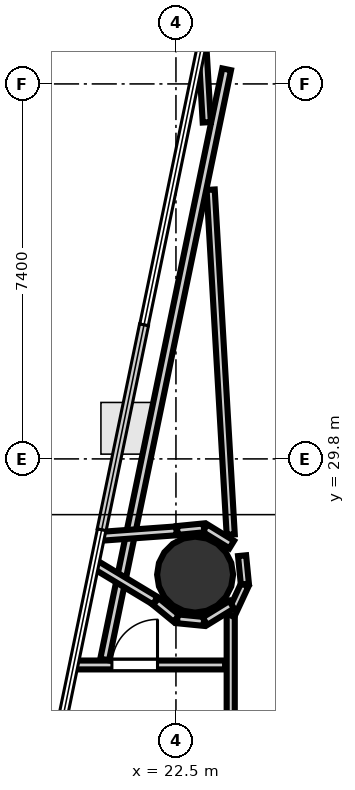
"""IFC4 building model, lengths in metres.
Left out: names, types, materials, properties, quantities, classifications, styles, units other than length and angle.
Written with IfcOpenShell. Run it as: python <this file> out.ifc"""

import sys

from ifc_helpers import new_model, si_unit, direction, frame, frame_2d, origin, origin_2d, place, context, subcontext, project, spatial, rectangle, hollow_circle, extrude, element, fill, save


model = new_model("IFC4")
c1 = context("Model", 3, precision=1e-05, world=origin(), true_north=direction((0.0, 1.0)))
c2 = subcontext(c1, "Body", "Model", "MODEL_VIEW")
j1 = project(units=[si_unit("LENGTHUNIT", "METRE"), si_unit("PLANEANGLEUNIT", "RADIAN")], contexts=[c1])
p1 = place(None, origin())
s1 = spatial("IfcSite", under=j1, at=p1, CompositionType="ELEMENT")
p2 = place(p1, origin())
s2 = spatial("IfcBuilding", under=s1, at=p2, CompositionType="ELEMENT")
p3 = place(p2, frame((0.0, 0.0, 97.8)))
s3 = spatial("IfcBuildingStorey", under=s2, at=p3, CompositionType="ELEMENT", Elevation=97.8)
p4 = place(p3, frame((22.878, 27.516, -0.23), z_axis=(0.0, 0.0, 1.0), x_axis=(1.0, 0.0, 0.0)))
e1 = element("IfcColumn", 1, at=p4, inside=s3, PredefinedType="COLUMN", context=c2, shape_type="SweptSolid", body=[
    extrude(hollow_circle(Radius=0.75, WallThickness=0.036, at=origin_2d()), origin(), (0.0, 0.0, 1.0), 3.93),
])
p5 = place(p3, frame((23.581, 28.307, 0.0), z_axis=(0.0, 0.0, 1.0), x_axis=(-0.058052312108, 0.99831354246, 0.0)))
e2 = element("IfcWall", 2, at=p5, inside=s3, PredefinedType="PARTITIONING", context=c2, shape_type="SweptSolid", body=[
    extrude(rectangle(XDim=6.817, YDim=0.16, at=frame_2d((3.409, 0.0))), origin(), (0.0, 0.0, 1.0), 2.84),
])
p6 = place(p3, frame((23.581, 18.15, 0.0), z_axis=(0.0, 0.0, 1.0), x_axis=(0.0, 1.0, 0.0)))
e3 = element("IfcWall", 3, at=p6, inside=s3, PredefinedType="PARTITIONING", context=c2, shape_type="SweptSolid", body=[
    extrude(rectangle(XDim=8.575, YDim=0.16, at=frame_2d((4.288, 0.0))), origin(), (0.0, 0.0, 1.0), 2.84),
])
p7 = place(p3, frame((23.578, 26.712, 0.0), z_axis=(0.0, 0.0, 1.0), x_axis=(0.421251946418, 0.906943657367, 0.0)))
e4 = element("IfcWall", 4, at=p7, inside=s3, PredefinedType="PARTITIONING", context=c2, shape_type="SweptSolid", body=[
    extrude(rectangle(XDim=0.663, YDim=0.16, at=frame_2d((0.332, 0.0))), origin(), (0.0, 0.0, 1.0), 2.84),
])
p8 = place(p3, frame((23.86, 27.33, 0.0), z_axis=(0.0, 0.0, 1.0), x_axis=(-0.098000919071, 0.995186324193, 0.0)))
e5 = element("IfcWall", 5, at=p8, inside=s3, PredefinedType="PARTITIONING", context=c2, shape_type="SweptSolid", body=[
    extrude(rectangle(XDim=0.563, YDim=0.16, at=frame_2d((0.281, 0.0))), origin(), (0.0, 0.0, 1.0), 2.84),
])
p9 = place(p3, frame((20.462, 25.733, 0.0), z_axis=(0.0, 0.0, 1.0), x_axis=(1.0, 0.0, 0.0)))
e6 = element("IfcWall", 6, at=p9, inside=s3, PredefinedType="PLUMBINGWALL", context=c2, shape_type="SweptSolid", body=[
    extrude(rectangle(XDim=3.008, YDim=0.175, at=frame_2d((1.504, 0.0))), origin(), (0.0, 0.0, 1.0), 2.84),
])
p10 = place(p9, frame((0.774, 0.0, 0.0)))
e7 = element("IfcOpeningElement", 7, at=p10, cuts=e6, PredefinedType="OPENING", context=c2, shape_type="SweptSolid", body=[
    extrude(rectangle(XDim=0.9, YDim=2.1, at=frame_2d((0.45, 1.05))), frame((0.0, 0.097, 0.0), z_axis=(0.0, -1.0, 0.0), x_axis=(1.0, 0.0, 0.0)), (0.0, 0.0, 1.0), 0.195),
])
p11 = place(p3, frame((21.093, 25.842, 0.0), z_axis=(0.0, 0.0, 1.0), x_axis=(0.202456257847, 0.979291306843, 0.0)))
e8 = element("IfcWall", 8, at=p11, inside=s3, PredefinedType="PLUMBINGWALL", context=c2, shape_type="SweptSolid", body=[
    extrude(rectangle(XDim=11.893, YDim=0.175, at=frame_2d((5.946, 0.0))), origin(), (0.0, 0.0, 1.0), 2.84),
])
p12 = place(p3, frame((23.6, 28.11, 0.0), z_axis=(0.0, 0.0, 1.0), x_axis=(-0.851712341449, 0.524009625316, 0.0)))
e9 = element("IfcWall", 9, at=p12, inside=s3, PredefinedType="PLUMBINGWALL", context=c2, shape_type="SweptSolid", body=[
    extrude(rectangle(XDim=0.621, YDim=0.175, at=frame_2d((0.31, 0.0))), origin(), (0.0, 0.0, 1.0), 2.84),
])
p13 = place(p3, frame((23.052, 28.439, 0.0), z_axis=(0.0, 0.0, 1.0), x_axis=(-0.995191506225, -0.09794828195, 0.0)))
e10 = element("IfcWall", 10, at=p13, inside=s3, PredefinedType="PLUMBINGWALL", context=c2, shape_type="SweptSolid", body=[
    extrude(rectangle(XDim=0.528, YDim=0.175, at=frame_2d((0.264, 0.0))), origin(), (0.0, 0.0, 1.0), 2.84),
])
p14 = place(p3, frame((22.51, 28.381, 0.0), z_axis=(0.0, 0.0, 1.0), x_axis=(-0.997386657244, -0.072248570591, 0.0)))
e11 = element("IfcWall", 11, at=p14, inside=s3, PredefinedType="PLUMBINGWALL", context=c2, shape_type="SweptSolid", body=[
    extrude(rectangle(XDim=1.507, YDim=0.175, at=frame_2d((0.753, 0.0))), origin(), (0.0, 0.0, 1.0), 2.84),
])
p15 = place(p3, frame((20.893, 27.723, 0.0), z_axis=(0.0, 0.0, 1.0), x_axis=(0.856752867716, -0.515727179487, 0.0)))
e12 = element("IfcWall", 12, at=p15, inside=s3, PredefinedType="PLUMBINGWALL", context=c2, shape_type="SweptSolid", body=[
    extrude(rectangle(XDim=1.399, YDim=0.175, at=frame_2d((0.699, 0.0))), origin(), (0.0, 0.0, 1.0), 2.84),
])
p16 = place(p3, frame((22.102, 26.987, 0.0), z_axis=(0.0, 0.0, 1.0), x_axis=(0.772823405661, -0.634621133955, 0.0)))
e13 = element("IfcWall", 13, at=p16, inside=s3, PredefinedType="PLUMBINGWALL", context=c2, shape_type="SweptSolid", body=[
    extrude(rectangle(XDim=0.528, YDim=0.175, at=frame_2d((0.264, 0.0))), origin(), (0.0, 0.0, 1.0), 2.84),
])
p17 = place(p3, frame((22.527, 26.644, 0.0), z_axis=(0.0, 0.0, 1.0), x_axis=(0.995191506225, -0.09794828195, 0.0)))
e14 = element("IfcWall", 14, at=p17, inside=s3, PredefinedType="PLUMBINGWALL", context=c2, shape_type="SweptSolid", body=[
    extrude(rectangle(XDim=0.528, YDim=0.175, at=frame_2d((0.264, 0.0))), origin(), (0.0, 0.0, 1.0), 2.84),
])
p18 = place(p3, frame((23.072, 26.597, 0.0), z_axis=(0.0, 0.0, 1.0), x_axis=(0.851536753009, 0.524294915363, 0.0)))
e15 = element("IfcWall", 15, at=p18, inside=s3, PredefinedType="PLUMBINGWALL", context=c2, shape_type="SweptSolid", body=[
    extrude(rectangle(XDim=0.621, YDim=0.175, at=frame_2d((0.31, 0.0))), origin(), (0.0, 0.0, 1.0), 2.84),
])
p19 = place(p3, frame((23.108, 36.442, 0.0), z_axis=(0.0, 0.0, 1.0), x_axis=(-0.057959830366, 0.99831891601, 0.0)))
e16 = element("IfcWall", 16, at=p19, inside=s3, PredefinedType="PARTITIONING", context=c2, shape_type="SweptSolid", body=[
    extrude(rectangle(XDim=1.559, YDim=0.16, at=frame_2d((0.779, 0.0))), origin(), (0.0, 0.0, 1.0), 2.84),
])
p20 = place(p10, origin())
e17 = element("IfcDoor", 17, at=p20, inside=s3, OperationType="SINGLE_SWING_RIGHT", PredefinedType="DOOR", context=c2, shape_type="SweptSolid", body=[
    extrude(rectangle(XDim=0.9, YDim=2.1, at=frame_2d((0.45, 1.05))), frame((0.0, 0.025, 0.0), z_axis=(0.0, -1.0, 0.0), x_axis=(1.0, 0.0, 0.0)), (0.0, 0.0, 1.0), 0.05),
])
fill(e7, e17)
save(model, sys.argv[1])
